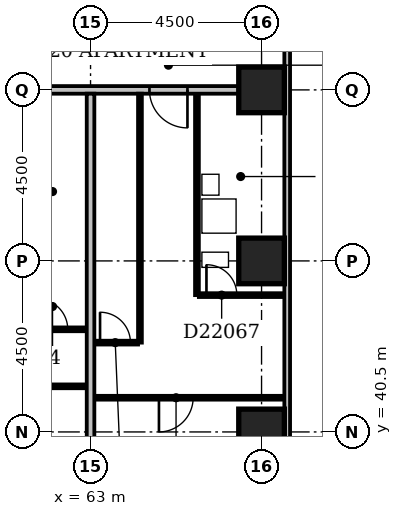
"""IFC4 building model, lengths in metres.
Left out: names, types, materials, properties, quantities, classifications, styles, units other than length and angle.
Written with IfcOpenShell. Run it as: python <this file> out.ifc"""

import sys

from ifc_helpers import new_model, si_unit, direction, frame, frame_2d, origin, origin_2d, place, context, subcontext, project, spatial, rectangle, extrude, element, fill, save


model = new_model("IFC4")
c1 = context("Model", 3, precision=1e-05, world=origin(), true_north=direction((0.0, 1.0)))
c2 = subcontext(c1, "Body", "Model", "MODEL_VIEW")
j1 = project(units=[si_unit("LENGTHUNIT", "METRE"), si_unit("PLANEANGLEUNIT", "RADIAN")], contexts=[c1])
p1 = place(None, origin())
s1 = spatial("IfcSite", under=j1, at=p1, CompositionType="ELEMENT")
p2 = place(p1, origin())
s2 = spatial("IfcBuilding", under=s1, at=p2, CompositionType="ELEMENT")
p3 = place(p2, frame((0.0, 0.0, 90.2)))
s3 = spatial("IfcBuildingStorey", under=s2, at=p3, CompositionType="ELEMENT", Elevation=90.2)
for number, where, z_axis, x_axis in (
    (1, (67.5, 40.5, -0.3), (0.0, 0.0, 1.0), (1.0, 0.0, 0.0)),
    (2, (67.5, 45.0, -0.3), (0.0, 0.0, 1.0), (1.0, 0.0, 0.0)),
    (3, (67.5, 49.5, -0.3), (0.0, 0.0, 1.0), (1.0, 0.0, 0.0)),
):
    element("IfcColumn", number, at=place(p3, frame(where, z_axis=z_axis, x_axis=x_axis)), inside=s3, PredefinedType="COLUMN", context=c2, shape_type="SweptSolid", body=[
        extrude(rectangle(XDim=1.2, YDim=1.2, at=origin_2d()), origin(), (0.0, 0.0, 1.0), 3.6),
    ])
p4 = place(p3, frame((68.175, 35.4, 0.0), z_axis=(0.0, 0.0, 1.0), x_axis=(0.0, 1.0, 0.0)))
e4 = element("IfcWall", 4, at=p4, inside=s3, PredefinedType="STANDARD", context=c2, shape_type="SweptSolid", body=[
    extrude(rectangle(XDim=23.85, YDim=0.15, at=frame_2d((11.925, 0.0))), origin(), (0.0, 0.0, 1.0), 2.7),
])
p5 = place(p4, frame((2.49, 0.0, 0.6)))
e5 = element("IfcOpeningElement", 5, at=p5, cuts=e4, PredefinedType="OPENING", context=c2, shape_type="SweptSolid", body=[
    extrude(rectangle(XDim=1.8, YDim=1.8, at=frame_2d((0.9, 0.9))), frame((0.0, 0.087, 0.0), z_axis=(0.0, -1.0, 0.0), x_axis=(1.0, 0.0, 0.0)), (0.0, 0.0, 1.0), 0.174),
])
p6 = place(p3, frame((63.0, 36.6, 0.0), z_axis=(0.0, 0.0, 1.0), x_axis=(0.0, 1.0, 0.0)))
e6 = element("IfcWall", 6, at=p6, inside=s3, PredefinedType="PARTITIONING", context=c2, shape_type="SweptSolid", body=[
    extrude(rectangle(XDim=12.8, YDim=0.2, at=frame_2d((6.4, 0.0))), origin(), (0.0, 0.0, 1.0), 2.4),
])
p7 = place(p3, frame((63.1, 41.4, 0.0), z_axis=(0.0, 0.0, 1.0), x_axis=(1.0, 0.0, 0.0)))
e7 = element("IfcWall", 7, at=p7, inside=s3, PredefinedType="PARTITIONING", context=c2, shape_type="SweptSolid", body=[
    extrude(rectangle(XDim=5.0, YDim=0.1, at=frame_2d((2.5, 0.0))), origin(), (0.0, 0.0, 1.0), 3.3),
])
p8 = place(p7, frame((1.7, 0.0, 0.0)))
e8 = element("IfcOpeningElement", 8, at=p8, cuts=e7, PredefinedType="OPENING", context=c2, shape_type="SweptSolid", body=[
    extrude(rectangle(XDim=0.9, YDim=2.1, at=frame_2d((0.45, 1.05))), frame((0.0, 0.062, 0.0), z_axis=(0.0, -1.0, 0.0), x_axis=(1.0, 0.0, 0.0)), (0.0, 0.0, 1.0), 0.124),
])
p9 = place(p3, frame((45.1, 41.7, 0.0), z_axis=(0.0, 0.0, 1.0), x_axis=(1.0, 0.0, 0.0)))
e9 = element("IfcWall", 9, at=p9, inside=s3, PredefinedType="PARTITIONING", context=c2, shape_type="SweptSolid", body=[
    extrude(rectangle(XDim=17.8, YDim=0.1, at=frame_2d((8.9, 0.0))), origin(), (0.0, 0.0, 1.0), 3.3),
])
p10 = place(p9, frame((1.7, 0.0, 0.0)))
e10 = element("IfcOpeningElement", 10, at=p10, cuts=e9, PredefinedType="OPENING", context=c2, shape_type="SweptSolid", body=[
    extrude(rectangle(XDim=0.9, YDim=2.1, at=frame_2d((0.45, 1.05))), frame((0.0, 0.062, 0.0), z_axis=(0.0, -1.0, 0.0), x_axis=(1.0, 0.0, 0.0)), (0.0, 0.0, 1.0), 0.124),
])
p11 = place(p9, frame((6.2, 0.0, 0.0)))
e11 = element("IfcOpeningElement", 11, at=p11, cuts=e9, PredefinedType="OPENING", context=c2, shape_type="SweptSolid", body=[
    extrude(rectangle(XDim=0.9, YDim=2.1, at=frame_2d((0.45, 1.05))), frame((0.0, 0.062, 0.0), z_axis=(0.0, -1.0, 0.0), x_axis=(1.0, 0.0, 0.0)), (0.0, 0.0, 1.0), 0.124),
])
p12 = place(p9, frame((11.85, 0.0, 0.0)))
e12 = element("IfcOpeningElement", 12, at=p12, cuts=e9, PredefinedType="OPENING", context=c2, shape_type="SweptSolid", body=[
    extrude(rectangle(XDim=0.9, YDim=2.1, at=frame_2d((0.45, 1.05))), frame((0.0, 0.062, 0.0), z_axis=(0.0, -1.0, 0.0), x_axis=(1.0, 0.0, 0.0)), (0.0, 0.0, 1.0), 0.124),
])
p13 = place(p9, frame((15.2, 0.0, 0.0)))
e13 = element("IfcOpeningElement", 13, at=p13, cuts=e9, PredefinedType="OPENING", context=c2, shape_type="SweptSolid", body=[
    extrude(rectangle(XDim=0.9, YDim=2.1, at=frame_2d((0.45, 1.05))), frame((0.0, 0.062, 0.0), z_axis=(0.0, -1.0, 0.0), x_axis=(1.0, 0.0, 0.0)), (0.0, 0.0, 1.0), 0.124),
])
p14 = place(p3, frame((63.1, 42.85, 0.0), z_axis=(0.0, 0.0, 1.0), x_axis=(1.0, 0.0, 0.0)))
e14 = element("IfcWall", 14, at=p14, inside=s3, PredefinedType="PARTITIONING", context=c2, shape_type="SweptSolid", body=[
    extrude(rectangle(XDim=1.15, YDim=0.1, at=frame_2d((0.575, 0.0))), origin(), (0.0, 0.0, 1.0), 3.3),
])
p15 = place(p14, frame((0.15, 0.0, 0.0)))
e15 = element("IfcOpeningElement", 15, at=p15, cuts=e14, PredefinedType="OPENING", context=c2, shape_type="SweptSolid", body=[
    extrude(rectangle(XDim=0.8, YDim=2.1, at=frame_2d((0.4, 1.05))), frame((0.0, 0.062, 0.0), z_axis=(0.0, -1.0, 0.0), x_axis=(1.0, 0.0, 0.0)), (0.0, 0.0, 1.0), 0.124),
])
p16 = place(p3, frame((64.3, 42.85, 0.0), z_axis=(0.0, 0.0, 1.0), x_axis=(0.0, 1.0, 0.0)))
e16 = element("IfcWall", 16, at=p16, inside=s3, PredefinedType="PARTITIONING", context=c2, shape_type="SweptSolid", body=[
    extrude(rectangle(XDim=6.55, YDim=0.1, at=frame_2d((3.275, 0.0))), origin(), (0.0, 0.0, 1.0), 3.3),
])
p17 = place(p3, frame((49.05, 43.2, 0.0), z_axis=(0.0, 0.0, 1.0), x_axis=(1.0, 0.0, 0.0)))
e17 = element("IfcWall", 17, at=p17, inside=s3, PredefinedType="PARTITIONING", context=c2, shape_type="SweptSolid", body=[
    extrude(rectangle(XDim=13.85, YDim=0.1, at=frame_2d((6.925, 0.0))), origin(), (0.0, 0.0, 1.0), 3.3),
])
p18 = place(p17, frame((6.85, 0.0, 0.0)))
e18 = element("IfcOpeningElement", 18, at=p18, cuts=e17, PredefinedType="OPENING", context=c2, shape_type="SweptSolid", body=[
    extrude(rectangle(XDim=0.8, YDim=2.1, at=frame_2d((0.4, 1.05))), frame((0.0, 0.062, 0.0), z_axis=(0.0, -1.0, 0.0), x_axis=(1.0, 0.0, 0.0)), (0.0, 0.0, 1.0), 0.124),
])
p19 = place(p17, frame((2.6, 0.0, 0.0)))
e19 = element("IfcOpeningElement", 19, at=p19, cuts=e17, PredefinedType="OPENING", context=c2, shape_type="SweptSolid", body=[
    extrude(rectangle(XDim=0.9, YDim=2.1, at=frame_2d((0.45, 1.05))), frame((0.0, 0.062, 0.0), z_axis=(0.0, -1.0, 0.0), x_axis=(1.0, 0.0, 0.0)), (0.0, 0.0, 1.0), 0.124),
])
p20 = place(p17, frame((12.55, 0.0, 0.0)))
e20 = element("IfcOpeningElement", 20, at=p20, cuts=e17, PredefinedType="OPENING", context=c2, shape_type="SweptSolid", body=[
    extrude(rectangle(XDim=0.8, YDim=2.1, at=frame_2d((0.4, 1.05))), frame((0.0, 0.062, 0.0), z_axis=(0.0, -1.0, 0.0), x_axis=(1.0, 0.0, 0.0)), (0.0, 0.0, 1.0), 0.124),
])
p21 = place(p17, frame((8.75, 0.0, 0.0)))
e21 = element("IfcOpeningElement", 21, at=p21, cuts=e17, PredefinedType="OPENING", context=c2, shape_type="SweptSolid", body=[
    extrude(rectangle(XDim=0.8, YDim=2.1, at=frame_2d((0.4, 1.05))), frame((0.0, 0.062, 0.0), z_axis=(0.0, -1.0, 0.0), x_axis=(1.0, 0.0, 0.0)), (0.0, 0.0, 1.0), 0.124),
])
p22 = place(p17, frame((10.55, 0.0, 0.0)))
e22 = element("IfcOpeningElement", 22, at=p22, cuts=e17, PredefinedType="OPENING", context=c2, shape_type="SweptSolid", body=[
    extrude(rectangle(XDim=0.8, YDim=2.1, at=frame_2d((0.4, 1.05))), frame((0.0, 0.062, 0.0), z_axis=(0.0, -1.0, 0.0), x_axis=(1.0, 0.0, 0.0)), (0.0, 0.0, 1.0), 0.124),
])
p23 = place(p3, frame((65.8, 44.1, 0.0), z_axis=(0.0, 0.0, 1.0), x_axis=(0.0, 1.0, 0.0)))
e23 = element("IfcWall", 23, at=p23, inside=s3, PredefinedType="PLUMBINGWALL", context=c2, shape_type="SweptSolid", body=[
    extrude(rectangle(XDim=5.3, YDim=0.1, at=frame_2d((2.65, 0.0))), origin(), (0.0, 0.0, 1.0), 3.3),
])
p24 = place(p3, frame((65.85, 44.1, 0.0), z_axis=(0.0, 0.0, 1.0), x_axis=(1.0, 0.0, 0.0)))
e24 = element("IfcWall", 24, at=p24, inside=s3, PredefinedType="PARTITIONING", context=c2, shape_type="SweptSolid", body=[
    extrude(rectangle(XDim=2.25, YDim=0.1, at=frame_2d((1.125, 0.0))), origin(), (0.0, 0.0, 1.0), 3.3),
])
p25 = place(p24, frame((0.2, 0.0, 0.0)))
e25 = element("IfcOpeningElement", 25, at=p25, cuts=e24, PredefinedType="OPENING", context=c2, shape_type="SweptSolid", body=[
    extrude(rectangle(XDim=0.8, YDim=2.1, at=frame_2d((0.4, 1.05))), frame((0.0, 0.062, 0.0), z_axis=(0.0, -1.0, 0.0), x_axis=(1.0, 0.0, 0.0)), (0.0, 0.0, 1.0), 0.124),
])
p26 = place(p3, frame((9.1, 49.5, 0.0), z_axis=(0.0, 0.0, 1.0), x_axis=(1.0, 0.0, 0.0)))
e26 = element("IfcWall", 26, at=p26, inside=s3, PredefinedType="PARTITIONING", context=c2, shape_type="SweptSolid", body=[
    extrude(rectangle(XDim=57.8, YDim=0.2, at=frame_2d((28.9, 0.0))), origin(), (0.0, 0.0, 1.0), 3.3),
])
p27 = place(p26, frame((13.7, 0.0, 0.0)))
e27 = element("IfcOpeningElement", 27, at=p27, cuts=e26, PredefinedType="OPENING", context=c2, shape_type="SweptSolid", body=[
    extrude(rectangle(XDim=1.0, YDim=2.1, at=frame_2d((0.5, 1.05))), frame((0.0, 0.112, 0.0), z_axis=(0.0, -1.0, 0.0), x_axis=(1.0, 0.0, 0.0)), (0.0, 0.0, 1.0), 0.224),
])
p28 = place(p26, frame((22.7, 0.0, 0.0)))
e28 = element("IfcOpeningElement", 28, at=p28, cuts=e26, PredefinedType="OPENING", context=c2, shape_type="SweptSolid", body=[
    extrude(rectangle(XDim=1.0, YDim=2.1, at=frame_2d((0.5, 1.05))), frame((0.0, 0.112, 0.0), z_axis=(0.0, -1.0, 0.0), x_axis=(1.0, 0.0, 0.0)), (0.0, 0.0, 1.0), 0.224),
])
p29 = place(p26, frame((38.6, 0.0, 0.0)))
e29 = element("IfcOpeningElement", 29, at=p29, cuts=e26, PredefinedType="OPENING", context=c2, shape_type="SweptSolid", body=[
    extrude(rectangle(XDim=1.0, YDim=2.1, at=frame_2d((0.5, 1.05))), frame((0.0, 0.112, 0.0), z_axis=(0.0, -1.0, 0.0), x_axis=(1.0, 0.0, 0.0)), (0.0, 0.0, 1.0), 0.224),
])
p30 = place(p26, frame((55.45, 0.0, 0.0)))
e30 = element("IfcOpeningElement", 30, at=p30, cuts=e26, PredefinedType="OPENING", context=c2, shape_type="SweptSolid", body=[
    extrude(rectangle(XDim=1.0, YDim=2.1, at=frame_2d((0.5, 1.05))), frame((0.0, 0.112, 0.0), z_axis=(0.0, -1.0, 0.0), x_axis=(1.0, 0.0, 0.0)), (0.0, 0.0, 1.0), 0.224),
])
p31 = place(p26, frame((6.15, 0.0, 0.0)))
e31 = element("IfcOpeningElement", 31, at=p31, cuts=e26, PredefinedType="OPENING", context=c2, shape_type="SweptSolid", body=[
    extrude(rectangle(XDim=0.9, YDim=2.1, at=frame_2d((0.45, 1.05))), frame((0.0, 0.112, 0.0), z_axis=(0.0, -1.0, 0.0), x_axis=(1.0, 0.0, 0.0)), (0.0, 0.0, 1.0), 0.224),
])
p32 = place(p8, frame((0.9, 0.0, 0.0), z_axis=(0.0, 0.0, 1.0), x_axis=(-1.0, 0.0, 0.0)))
e32 = element("IfcDoor", 32, at=p32, inside=s3, OperationType="SINGLE_SWING_RIGHT", PredefinedType="DOOR", context=c2, shape_type="SweptSolid", body=[
    extrude(rectangle(XDim=0.9, YDim=2.1, at=frame_2d((0.45, 1.05))), frame((0.0, 0.025, 0.0), z_axis=(0.0, -1.0, 0.0), x_axis=(1.0, 0.0, 0.0)), (0.0, 0.0, 1.0), 0.05),
])
fill(e8, e32)
p33 = place(p15, origin())
e33 = element("IfcDoor", 33, at=p33, inside=s3, OperationType="SINGLE_SWING_LEFT", PredefinedType="DOOR", context=c2, shape_type="SweptSolid", body=[
    extrude(rectangle(XDim=0.8, YDim=2.1, at=frame_2d((0.4, 1.05))), frame((0.0, 0.025, 0.0), z_axis=(0.0, -1.0, 0.0), x_axis=(1.0, 0.0, 0.0)), (0.0, 0.0, 1.0), 0.05),
])
fill(e15, e33)
p34 = place(p20, origin())
e34 = element("IfcDoor", 34, at=p34, inside=s3, OperationType="SINGLE_SWING_LEFT", PredefinedType="DOOR", context=c2, shape_type="SweptSolid", body=[
    extrude(rectangle(XDim=0.8, YDim=2.1, at=frame_2d((0.4, 1.05))), frame((0.0, 0.025, 0.0), z_axis=(0.0, -1.0, 0.0), x_axis=(1.0, 0.0, 0.0)), (0.0, 0.0, 1.0), 0.05),
])
fill(e20, e34)
p35 = place(p25, origin())
e35 = element("IfcDoor", 35, at=p35, inside=s3, OperationType="SINGLE_SWING_LEFT", PredefinedType="DOOR", context=c2, shape_type="SweptSolid", body=[
    extrude(rectangle(XDim=0.8, YDim=2.1, at=frame_2d((0.4, 1.05))), frame((0.0, 0.025, 0.0), z_axis=(0.0, -1.0, 0.0), x_axis=(1.0, 0.0, 0.0)), (0.0, 0.0, 1.0), 0.05),
])
fill(e25, e35)
p36 = place(p30, origin())
e36 = element("IfcDoor", 36, at=p36, inside=s3, OperationType="SINGLE_SWING_RIGHT", PredefinedType="DOOR", context=c2, shape_type="SweptSolid", body=[
    extrude(rectangle(XDim=1.0, YDim=2.1, at=frame_2d((0.5, 1.05))), frame((0.0, 0.025, 0.0), z_axis=(0.0, -1.0, 0.0), x_axis=(1.0, 0.0, 0.0)), (0.0, 0.0, 1.0), 0.05),
])
fill(e30, e36)
save(model, sys.argv[1])
